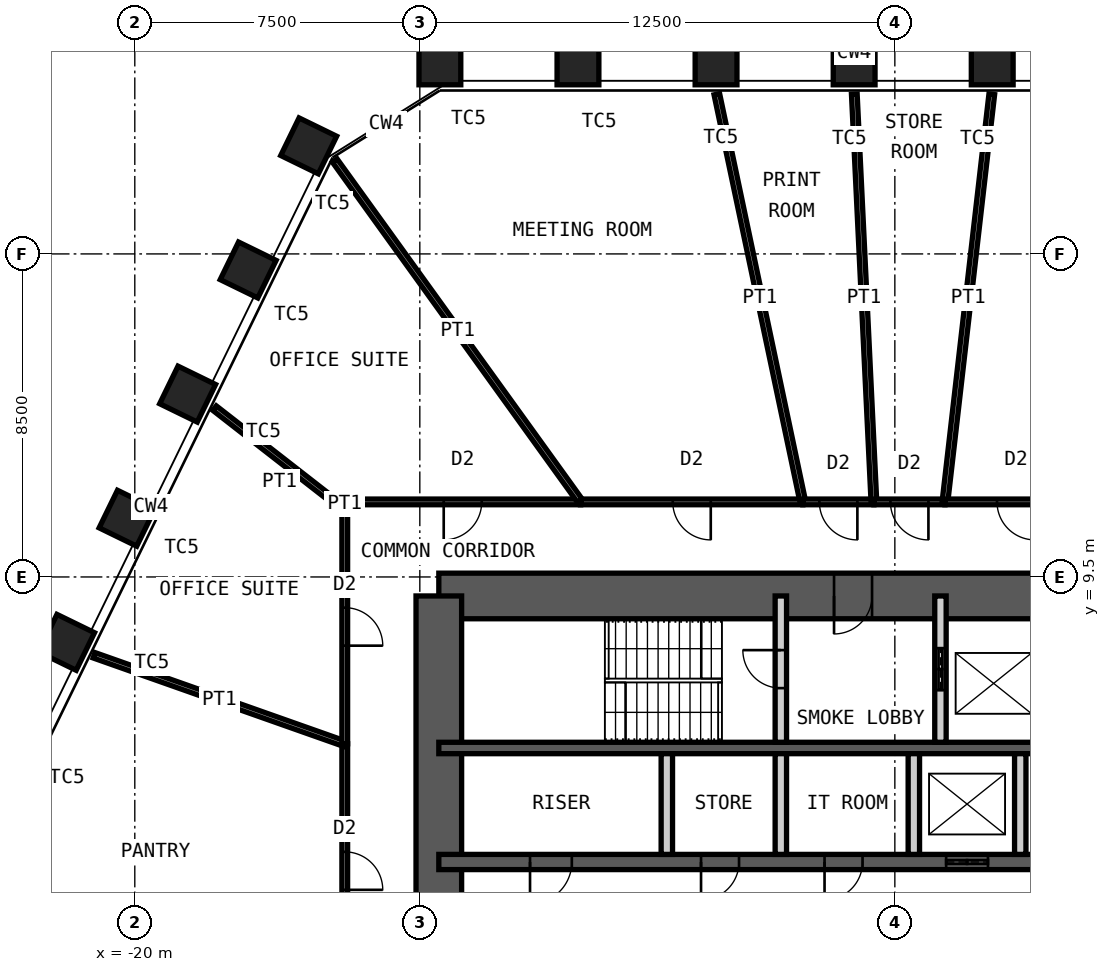
"""IFC4 building model, lengths in metres.
Left out: names, types, materials, properties, quantities, classifications, styles, units other than length and angle.
Written with IfcOpenShell. Run it as: python <this file> out.ifc"""

import sys

from ifc_helpers import new_model, si_unit, direction, frame, frame_2d, origin, origin_2d, place, context, subcontext, project, spatial, rectangle, hollow_rectangle, extrude, element, fill, save


model = new_model("IFC4")
c1 = context("Model", 3, precision=1e-05, world=origin(), true_north=direction((0.0, 1.0)))
c2 = subcontext(c1, "Body", "Model", "MODEL_VIEW")
j1 = project(units=[si_unit("LENGTHUNIT", "METRE"), si_unit("PLANEANGLEUNIT", "RADIAN")], contexts=[c1])
p1 = place(None, origin())
s1 = spatial("IfcSite", under=j1, at=p1, CompositionType="ELEMENT")
p2 = place(p1, origin())
s2 = spatial("IfcBuilding", under=s1, at=p2, CompositionType="ELEMENT")
p3 = place(p2, frame((0.0, 0.0, 197.2)))
s3 = spatial("IfcBuildingStorey", under=s2, at=p3, CompositionType="ELEMENT", Elevation=197.2)
for number, where, z_axis, x_axis in (
    (1, (-11.972, 23.0, 0.0), (0.0, 0.0, 1.0), (-1.0, 0.0, 0.0)),
    (2, (-8.338, 23.0, 0.0), (0.0, 0.0, 1.0), (-1.0, 0.0, 0.0)),
    (3, (-4.705, 23.0, 0.0), (0.0, 0.0, 1.0), (-1.0, 0.0, 0.0)),
    (4, (-1.071, 23.0, 0.0), (0.0, 0.0, 1.0), (-1.0, 0.0, 0.0)),
    (5, (2.562, 23.0, 0.0), (0.0, 0.0, 1.0), (-1.0, 0.0, 0.0)),
    (6, (-21.795, 7.78, 0.0), (0.0, 0.0, 1.0), (-0.438, -0.899, 0.0)),
    (7, (-20.203, 11.045, 0.0), (0.0, 0.0, 1.0), (-0.438, -0.899, 0.0)),
    (8, (-18.61, 14.311, 0.0), (0.0, 0.0, 1.0), (-0.438, -0.899, 0.0)),
    (9, (-17.017, 17.577, 0.0), (0.0, 0.0, 1.0), (-0.438, -0.899, 0.0)),
    (10, (-15.424, 20.843, 0.0), (0.0, 0.0, 1.0), (-0.438, -0.899, 0.0)),
):
    element("IfcColumn", number, at=place(p3, frame(where, z_axis=z_axis, x_axis=x_axis)), inside=s3, PredefinedType="COLUMN", context=c2, shape_type="SweptSolid", body=[
        extrude(hollow_rectangle(XDim=1.1, YDim=1.1, WallThickness=0.07, at=origin_2d()), origin(), (0.0, 0.0, 1.0), 4.2),
    ])
p4 = place(p3, frame((-12.0, 9.0, 0.0), z_axis=(0.0, 0.0, 1.0), x_axis=(1.0, 0.0, 0.0)))
e11 = element("IfcWall", 11, at=p4, inside=s3, PredefinedType="SHEAR", context=c2, shape_type="SweptSolid", body=[
    extrude(rectangle(XDim=24.0, YDim=1.2, at=frame_2d((12.0, 0.0))), origin(), (0.0, 0.0, 1.0), 4.2),
])
p5 = place(p4, frame((10.4, 0.0, 0.0)))
e12 = element("IfcOpeningElement", 12, at=p5, cuts=e11, PredefinedType="OPENING", context=c2, shape_type="SweptSolid", body=[
    extrude(rectangle(XDim=1.0, YDim=2.1, at=frame_2d((0.5, 1.05))), frame((0.0, 0.61, 0.0), z_axis=(0.0, -1.0, 0.0), x_axis=(1.0, 0.0, 0.0)), (0.0, 0.0, 1.0), 1.22),
])
p6 = place(p4, frame((17.6, 0.0, 0.0)))
e13 = element("IfcOpeningElement", 13, at=p6, cuts=e11, PredefinedType="OPENING", context=c2, shape_type="SweptSolid", body=[
    extrude(rectangle(XDim=0.9, YDim=2.1, at=frame_2d((0.45, 1.05))), frame((0.0, 0.61, 0.0), z_axis=(0.0, -1.0, 0.0), x_axis=(1.0, 0.0, 0.0)), (0.0, 0.0, 1.0), 1.22),
])
p7 = place(p4, frame((21.9, 0.0, 0.0)))
e14 = element("IfcOpeningElement", 14, at=p7, cuts=e11, PredefinedType="OPENING", context=c2, shape_type="SweptSolid", body=[
    extrude(rectangle(XDim=0.9, YDim=2.1, at=frame_2d((0.45, 1.05))), frame((0.0, 0.61, 0.0), z_axis=(0.0, -1.0, 0.0), x_axis=(1.0, 0.0, 0.0)), (0.0, 0.0, 1.0), 1.22),
])
p8 = place(p3, frame((-12.0, -9.0, 0.0), z_axis=(0.0, 0.0, 1.0), x_axis=(0.0, 1.0, 0.0)))
e15 = element("IfcWall", 15, at=p8, inside=s3, PredefinedType="SHEAR", context=c2, shape_type="SweptSolid", body=[
    extrude(rectangle(XDim=18.0, YDim=1.2, at=frame_2d((9.0, 0.0))), origin(), (0.0, 0.0, 1.0), 4.2),
])
p9 = place(p8, frame((8.1, 0.0, 0.0)))
e16 = element("IfcOpeningElement", 16, at=p9, cuts=e15, PredefinedType="OPENING", context=c2, shape_type="SweptSolid", body=[
    extrude(rectangle(XDim=1.8, YDim=2.1, at=frame_2d((0.9, 1.05))), frame((0.0, 0.61, 0.0), z_axis=(0.0, -1.0, 0.0), x_axis=(1.0, 0.0, 0.0)), (0.0, 0.0, 1.0), 1.22),
])
p10 = place(p3, frame((-12.0, 5.0, 0.0), z_axis=(0.0, 0.0, 1.0), x_axis=(1.0, 0.0, 0.0)))
e17 = element("IfcWall", 17, at=p10, inside=s3, PredefinedType="SHEAR", context=c2, shape_type="SweptSolid", body=[
    extrude(rectangle(XDim=24.0, YDim=0.3, at=frame_2d((12.0, 0.0))), origin(), (0.0, 0.0, 1.0), 4.2),
])
p11 = place(p3, frame((-12.0, 2.0, 0.0), z_axis=(0.0, 0.0, 1.0), x_axis=(1.0, 0.0, 0.0)))
e18 = element("IfcWall", 18, at=p11, inside=s3, PredefinedType="SHEAR", context=c2, shape_type="SweptSolid", body=[
    extrude(rectangle(XDim=24.0, YDim=0.4, at=frame_2d((12.0, 0.0))), origin(), (0.0, 0.0, 1.0), 4.2),
])
p12 = place(p11, frame((2.4, 0.0, 0.0)))
e19 = element("IfcOpeningElement", 19, at=p12, cuts=e18, PredefinedType="OPENING", context=c2, shape_type="SweptSolid", body=[
    extrude(rectangle(XDim=1.1, YDim=2.1, at=frame_2d((0.55, 1.05))), frame((0.0, 0.21, 0.0), z_axis=(0.0, -1.0, 0.0), x_axis=(1.0, 0.0, 0.0)), (0.0, 0.0, 1.0), 0.42),
])
p13 = place(p11, frame((22.0, 0.0, 0.0)))
e20 = element("IfcOpeningElement", 20, at=p13, cuts=e18, PredefinedType="OPENING", context=c2, shape_type="SweptSolid", body=[
    extrude(rectangle(XDim=1.1, YDim=2.1, at=frame_2d((0.55, 1.05))), frame((0.0, 0.21, 0.0), z_axis=(0.0, -1.0, 0.0), x_axis=(1.0, 0.0, 0.0)), (0.0, 0.0, 1.0), 0.42),
])
p14 = place(p11, frame((10.15, 0.0, 0.0)))
e21 = element("IfcOpeningElement", 21, at=p14, cuts=e18, PredefinedType="OPENING", context=c2, shape_type="SweptSolid", body=[
    extrude(rectangle(XDim=1.0, YDim=2.1, at=frame_2d((0.5, 1.05))), frame((0.0, 0.21, 0.0), z_axis=(0.0, -1.0, 0.0), x_axis=(1.0, 0.0, 0.0)), (0.0, 0.0, 1.0), 0.42),
])
p15 = place(p11, frame((6.9, 0.0, 0.0)))
e22 = element("IfcOpeningElement", 22, at=p15, cuts=e18, PredefinedType="OPENING", context=c2, shape_type="SweptSolid", body=[
    extrude(rectangle(XDim=1.0, YDim=2.1, at=frame_2d((0.5, 1.05))), frame((0.0, 0.21, 0.0), z_axis=(0.0, -1.0, 0.0), x_axis=(1.0, 0.0, 0.0)), (0.0, 0.0, 1.0), 0.42),
])
p16 = place(p11, frame((13.35, 0.0, 0.0)))
e23 = element("IfcOpeningElement", 23, at=p16, cuts=e18, PredefinedType="OPENING", context=c2, shape_type="SweptSolid", body=[
    extrude(rectangle(XDim=1.1, YDim=2.4, at=frame_2d((0.55, 1.2))), frame((0.0, 0.21, 0.0), z_axis=(0.0, -1.0, 0.0), x_axis=(1.0, 0.0, 0.0)), (0.0, 0.0, 1.0), 0.42),
])
p17 = place(p11, frame((16.15, 0.0, 0.0)))
e24 = element("IfcOpeningElement", 24, at=p17, cuts=e18, PredefinedType="OPENING", context=c2, shape_type="SweptSolid", body=[
    extrude(rectangle(XDim=1.1, YDim=2.4, at=frame_2d((0.55, 1.2))), frame((0.0, 0.21, 0.0), z_axis=(0.0, -1.0, 0.0), x_axis=(1.0, 0.0, 0.0)), (0.0, 0.0, 1.0), 0.42),
])
p18 = place(p11, frame((18.95, 0.0, 0.0)))
e25 = element("IfcOpeningElement", 25, at=p18, cuts=e18, PredefinedType="OPENING", context=c2, shape_type="SweptSolid", body=[
    extrude(rectangle(XDim=1.1, YDim=2.4, at=frame_2d((0.55, 1.2))), frame((0.0, 0.21, 0.0), z_axis=(0.0, -1.0, 0.0), x_axis=(1.0, 0.0, 0.0)), (0.0, 0.0, 1.0), 0.42),
])
p19 = place(p3, frame((-3.0, 5.15, 0.0), z_axis=(0.0, 0.0, 1.0), x_axis=(0.0, 1.0, 0.0)))
e26 = element("IfcWall", 26, at=p19, inside=s3, PredefinedType="PARTITIONING", context=c2, shape_type="SweptSolid", body=[
    extrude(rectangle(XDim=3.85, YDim=0.3, at=frame_2d((1.925, 0.0))), origin(), (0.0, 0.0, 1.0), 3.98),
])
p20 = place(p19, frame((1.425, 0.0, 0.0)))
e27 = element("IfcOpeningElement", 27, at=p20, cuts=e26, PredefinedType="OPENING", context=c2, shape_type="SweptSolid", body=[
    extrude(rectangle(XDim=1.0, YDim=2.1, at=frame_2d((0.5, 1.05))), frame((0.0, 0.16, 0.0), z_axis=(0.0, -1.0, 0.0), x_axis=(1.0, 0.0, 0.0)), (0.0, 0.0, 1.0), 0.32),
])
p21 = place(p3, frame((1.2, 5.15, 0.0), z_axis=(0.0, 0.0, 1.0), x_axis=(0.0, 1.0, 0.0)))
e28 = element("IfcWall", 28, at=p21, inside=s3, PredefinedType="PARTITIONING", context=c2, shape_type="SweptSolid", body=[
    extrude(rectangle(XDim=3.85, YDim=0.3, at=frame_2d((1.925, 0.0))), origin(), (0.0, 0.0, 1.0), 3.98),
])
p22 = place(p21, frame((1.375, 0.0, 0.0)))
e29 = element("IfcOpeningElement", 29, at=p22, cuts=e28, PredefinedType="OPENING", context=c2, shape_type="SweptSolid", body=[
    extrude(rectangle(XDim=1.1, YDim=2.4, at=frame_2d((0.55, 1.2))), frame((0.0, 0.16, 0.0), z_axis=(0.0, -1.0, 0.0), x_axis=(1.0, 0.0, 0.0)), (0.0, 0.0, 1.0), 0.32),
])
for number, where, z_axis, x_axis in (
    (30, (-6.0, 2.2, 0.0), (0.0, 0.0, 1.0), (0.0, 1.0, 0.0)),
    (31, (-3.0, 2.2, 0.0), (0.0, 0.0, 1.0), (0.0, 1.0, 0.0)),
    (32, (0.5, 2.2, 0.0), (0.0, 0.0, 1.0), (0.0, 1.0, 0.0)),
    (33, (3.3, 2.2, 0.0), (0.0, 0.0, 1.0), (0.0, 1.0, 0.0)),
):
    element("IfcWall", number, at=place(p3, frame(where, z_axis=z_axis, x_axis=x_axis)), inside=s3, PredefinedType="PARTITIONING", context=c2, shape_type="SweptSolid", body=[
        extrude(rectangle(XDim=2.65, YDim=0.3, at=frame_2d((1.325, 0.0))), origin(), (0.0, 0.0, 1.0), 3.98),
    ])
p23 = place(p3, frame((-14.475, -1.576, 0.0), z_axis=(0.0, 0.0, 1.0), x_axis=(0.0, 1.0, 0.0)))
e34 = element("IfcWall", 34, at=p23, inside=s3, PredefinedType="PARTITIONING", context=c2, shape_type="SweptSolid", body=[
    extrude(rectangle(XDim=6.686, YDim=0.15, at=frame_2d((3.343, 0.0))), origin(), (0.0, 0.0, 1.0), 4.03),
])
p24 = place(p23, frame((2.843, 0.0, 0.0)))
e35 = element("IfcOpeningElement", 35, at=p24, cuts=e34, PredefinedType="OPENING", context=c2, shape_type="SweptSolid", body=[
    extrude(rectangle(XDim=1.0, YDim=2.4, at=frame_2d((0.5, 1.2))), frame((0.0, 0.085, 0.0), z_axis=(0.0, -1.0, 0.0), x_axis=(1.0, 0.0, 0.0)), (0.0, 0.0, 1.0), 0.17),
])
p25 = place(p3, frame((-21.072, 7.439, 0.0), z_axis=(0.0, 0.0, 1.0), x_axis=(0.94295553867, -0.332918686907, 0.0)))
e36 = element("IfcWall", 36, at=p25, inside=s3, PredefinedType="PARTITIONING", context=c2, shape_type="SweptSolid", body=[
    extrude(rectangle(XDim=6.996, YDim=0.15, at=frame_2d((3.498, 0.0))), origin(), (0.0, 0.0, 1.0), 3.43),
])
p26 = place(p3, frame((-14.475, 5.11, 0.0), z_axis=(0.0, 0.0, 1.0), x_axis=(0.0, 1.0, 0.0)))
e37 = element("IfcWall", 37, at=p26, inside=s3, PredefinedType="PARTITIONING", context=c2, shape_type="SweptSolid", body=[
    extrude(rectangle(XDim=6.164, YDim=0.15, at=frame_2d((3.082, 0.0))), origin(), (0.0, 0.0, 1.0), 4.03),
])
p27 = place(p26, frame((2.582, 0.0, 0.0)))
e38 = element("IfcOpeningElement", 38, at=p27, cuts=e37, PredefinedType="OPENING", context=c2, shape_type="SweptSolid", body=[
    extrude(rectangle(XDim=1.0, YDim=2.4, at=frame_2d((0.5, 1.2))), frame((0.0, 0.085, 0.0), z_axis=(0.0, -1.0, 0.0), x_axis=(1.0, 0.0, 0.0)), (0.0, 0.0, 1.0), 0.17),
])
p28 = place(p3, frame((-17.902, 13.943, 0.0), z_axis=(0.0, 0.0, 1.0), x_axis=(0.788919197717, -0.614496948303, 0.0)))
e39 = element("IfcWall", 39, at=p28, inside=s3, PredefinedType="PARTITIONING", context=c2, shape_type="SweptSolid", body=[
    extrude(rectangle(XDim=4.343, YDim=0.15, at=frame_2d((2.172, 0.0))), origin(), (0.0, 0.0, 1.0), 3.43),
])
p29 = place(p3, frame((-14.475, 11.369, 0.0), z_axis=(0.0, 0.0, 1.0), x_axis=(0.0, 1.0, 0.0)))
e40 = element("IfcWall", 40, at=p29, inside=s3, PredefinedType="PARTITIONING", context=c2, shape_type="SweptSolid", body=[
    extrude(rectangle(XDim=0.106, YDim=0.15, at=frame_2d((0.053, 0.0))), origin(), (0.0, 0.0, 1.0), 4.03),
])
p30 = place(p3, frame((-14.475, 11.475, 0.0), z_axis=(0.0, 0.0, 1.0), x_axis=(1.0, 0.0, 0.0)))
e41 = element("IfcWall", 41, at=p30, inside=s3, PredefinedType="PARTITIONING", context=c2, shape_type="SweptSolid", body=[
    extrude(rectangle(XDim=6.208, YDim=0.15, at=frame_2d((3.104, 0.0))), origin(), (0.0, 0.0, 1.0), 4.03),
])
p31 = place(p30, frame((2.604, 0.0, 0.0)))
e42 = element("IfcOpeningElement", 42, at=p31, cuts=e41, PredefinedType="OPENING", context=c2, shape_type="SweptSolid", body=[
    extrude(rectangle(XDim=1.0, YDim=2.4, at=frame_2d((0.5, 1.2))), frame((0.0, 0.085, 0.0), z_axis=(0.0, -1.0, 0.0), x_axis=(1.0, 0.0, 0.0)), (0.0, 0.0, 1.0), 0.17),
])
p32 = place(p3, frame((-14.737, 20.455, 0.0), z_axis=(0.0, 0.0, 1.0), x_axis=(0.584547025688, -0.811359830629, 0.0)))
e43 = element("IfcWall", 43, at=p32, inside=s3, PredefinedType="PARTITIONING", context=c2, shape_type="SweptSolid", body=[
    extrude(rectangle(XDim=11.068, YDim=0.15, at=frame_2d((5.534, 0.0))), origin(), (0.0, 0.0, 1.0), 2.93),
])
p33 = place(p3, frame((-8.267, 11.475, 0.0), z_axis=(0.0, 0.0, 1.0), x_axis=(1.0, 0.0, 0.0)))
e44 = element("IfcWall", 44, at=p33, inside=s3, PredefinedType="PARTITIONING", context=c2, shape_type="SweptSolid", body=[
    extrude(rectangle(XDim=5.846, YDim=0.15, at=frame_2d((2.923, 0.0))), origin(), (0.0, 0.0, 1.0), 4.03),
])
p34 = place(p33, frame((2.423, 0.0, 0.0)))
e45 = element("IfcOpeningElement", 45, at=p34, cuts=e44, PredefinedType="OPENING", context=c2, shape_type="SweptSolid", body=[
    extrude(rectangle(XDim=1.0, YDim=2.4, at=frame_2d((0.5, 1.2))), frame((0.0, 0.085, 0.0), z_axis=(0.0, -1.0, 0.0), x_axis=(1.0, 0.0, 0.0)), (0.0, 0.0, 1.0), 0.17),
])
p35 = place(p3, frame((-4.684, 22.202, 0.0), z_axis=(0.0, 0.0, 1.0), x_axis=(0.206456017157, -0.978455881979, 0.0)))
e46 = element("IfcWall", 46, at=p35, inside=s3, PredefinedType="PARTITIONING", context=c2, shape_type="SweptSolid", body=[
    extrude(rectangle(XDim=10.963, YDim=0.15, at=frame_2d((5.481, 0.0))), origin(), (0.0, 0.0, 1.0), 3.43),
])
p36 = place(p3, frame((-2.421, 11.475, 0.0), z_axis=(0.0, 0.0, 1.0), x_axis=(1.0, 0.0, 0.0)))
e47 = element("IfcWall", 47, at=p36, inside=s3, PredefinedType="PARTITIONING", context=c2, shape_type="SweptSolid", body=[
    extrude(rectangle(XDim=1.87, YDim=0.15, at=frame_2d((0.935, 0.0))), origin(), (0.0, 0.0, 1.0), 4.03),
])
p37 = place(p36, frame((0.435, 0.0, 0.0)))
e48 = element("IfcOpeningElement", 48, at=p37, cuts=e47, PredefinedType="OPENING", context=c2, shape_type="SweptSolid", body=[
    extrude(rectangle(XDim=1.0, YDim=2.4, at=frame_2d((0.5, 1.2))), frame((0.0, 0.085, 0.0), z_axis=(0.0, -1.0, 0.0), x_axis=(1.0, 0.0, 0.0)), (0.0, 0.0, 1.0), 0.17),
])
p38 = place(p3, frame((-1.067, 22.2, 0.0), z_axis=(0.0, 0.0, 1.0), x_axis=(0.047998335863, -0.998847415652, 0.0)))
e49 = element("IfcWall", 49, at=p38, inside=s3, PredefinedType="PARTITIONING", context=c2, shape_type="SweptSolid", body=[
    extrude(rectangle(XDim=10.738, YDim=0.15, at=frame_2d((5.369, 0.0))), origin(), (0.0, 0.0, 1.0), 3.43),
])
p39 = place(p3, frame((-0.551, 11.475, 0.0), z_axis=(0.0, 0.0, 1.0), x_axis=(1.0, 0.0, 0.0)))
e50 = element("IfcWall", 50, at=p39, inside=s3, PredefinedType="PARTITIONING", context=c2, shape_type="SweptSolid", body=[
    extrude(rectangle(XDim=1.87, YDim=0.15, at=frame_2d((0.935, 0.0))), origin(), (0.0, 0.0, 1.0), 4.03),
])
p40 = place(p39, frame((0.435, 0.0, 0.0)))
e51 = element("IfcOpeningElement", 51, at=p40, cuts=e50, PredefinedType="OPENING", context=c2, shape_type="SweptSolid", body=[
    extrude(rectangle(XDim=1.0, YDim=2.4, at=frame_2d((0.5, 1.2))), frame((0.0, 0.085, 0.0), z_axis=(0.0, -1.0, 0.0), x_axis=(1.0, 0.0, 0.0)), (0.0, 0.0, 1.0), 0.17),
])
p41 = place(p3, frame((2.551, 22.201, 0.0), z_axis=(0.0, 0.0, 1.0), x_axis=(-0.11415373111, -0.993463097288, 0.0)))
e52 = element("IfcWall", 52, at=p41, inside=s3, PredefinedType="PARTITIONING", context=c2, shape_type="SweptSolid", body=[
    extrude(rectangle(XDim=10.796, YDim=0.15, at=frame_2d((5.398, 0.0))), origin(), (0.0, 0.0, 1.0), 3.43),
])
p42 = place(p3, frame((1.318, 11.475, 0.0), z_axis=(0.0, 0.0, 1.0), x_axis=(1.0, 0.0, 0.0)))
e53 = element("IfcWall", 53, at=p42, inside=s3, PredefinedType="PARTITIONING", context=c2, shape_type="SweptSolid", body=[
    extrude(rectangle(XDim=3.74, YDim=0.15, at=frame_2d((1.87, 0.0))), origin(), (0.0, 0.0, 1.0), 4.03),
])
p43 = place(p42, frame((1.37, 0.0, 0.0)))
e54 = element("IfcOpeningElement", 54, at=p43, cuts=e53, PredefinedType="OPENING", context=c2, shape_type="SweptSolid", body=[
    extrude(rectangle(XDim=1.0, YDim=2.4, at=frame_2d((0.5, 1.2))), frame((0.0, 0.085, 0.0), z_axis=(0.0, -1.0, 0.0), x_axis=(1.0, 0.0, 0.0)), (0.0, 0.0, 1.0), 0.17),
])
p44 = place(p5, origin())
e55 = element("IfcDoor", 55, at=p44, inside=s3, OperationType="SINGLE_SWING_LEFT", PredefinedType="DOOR", context=c2, shape_type="SweptSolid", body=[
    extrude(rectangle(XDim=1.0, YDim=2.1, at=frame_2d((0.5, 1.05))), frame((0.0, 0.025, 0.0), z_axis=(0.0, -1.0, 0.0), x_axis=(1.0, 0.0, 0.0)), (0.0, 0.0, 1.0), 0.05),
])
fill(e12, e55)
p45 = place(p20, origin())
e56 = element("IfcDoor", 56, at=p45, inside=s3, OperationType="SINGLE_SWING_LEFT", PredefinedType="DOOR", context=c2, shape_type="SweptSolid", body=[
    extrude(rectangle(XDim=1.0, YDim=2.1, at=frame_2d((0.5, 1.05))), frame((0.0, 0.025, 0.0), z_axis=(0.0, -1.0, 0.0), x_axis=(1.0, 0.0, 0.0)), (0.0, 0.0, 1.0), 0.05),
])
fill(e27, e56)
p46 = place(p12, origin())
e57 = element("IfcDoor", 57, at=p46, inside=s3, OperationType="SINGLE_SWING_LEFT", PredefinedType="DOOR", context=c2, shape_type="SweptSolid", body=[
    extrude(rectangle(XDim=1.1, YDim=2.1, at=frame_2d((0.55, 1.05))), frame((0.0, 0.025, 0.0), z_axis=(0.0, -1.0, 0.0), x_axis=(1.0, 0.0, 0.0)), (0.0, 0.0, 1.0), 0.05),
])
fill(e19, e57)
p47 = place(p14, origin())
e58 = element("IfcDoor", 58, at=p47, inside=s3, OperationType="SINGLE_SWING_LEFT", PredefinedType="DOOR", context=c2, shape_type="SweptSolid", body=[
    extrude(rectangle(XDim=1.0, YDim=2.1, at=frame_2d((0.5, 1.05))), frame((0.0, 0.025, 0.0), z_axis=(0.0, -1.0, 0.0), x_axis=(1.0, 0.0, 0.0)), (0.0, 0.0, 1.0), 0.05),
])
fill(e21, e58)
p48 = place(p22, origin())
e59 = element("IfcDoor", 59, at=p48, inside=s3, OperationType="DOUBLE_DOOR_SLIDING", PredefinedType="DOOR", context=c2, shape_type="SweptSolid", body=[
    extrude(rectangle(XDim=1.1, YDim=2.4, at=frame_2d((0.55, 1.2))), frame((0.0, 0.025, 0.0), z_axis=(0.0, -1.0, 0.0), x_axis=(1.0, 0.0, 0.0)), (0.0, 0.0, 1.0), 0.05),
])
fill(e29, e59)
p49 = place(p15, origin())
e60 = element("IfcDoor", 60, at=p49, inside=s3, OperationType="SINGLE_SWING_LEFT", PredefinedType="DOOR", context=c2, shape_type="SweptSolid", body=[
    extrude(rectangle(XDim=1.0, YDim=2.1, at=frame_2d((0.5, 1.05))), frame((0.0, 0.025, 0.0), z_axis=(0.0, -1.0, 0.0), x_axis=(1.0, 0.0, 0.0)), (0.0, 0.0, 1.0), 0.05),
])
fill(e22, e60)
p50 = place(p16, origin())
e61 = element("IfcDoor", 61, at=p50, inside=s3, OperationType="DOUBLE_DOOR_SLIDING", PredefinedType="DOOR", context=c2, shape_type="SweptSolid", body=[
    extrude(rectangle(XDim=1.1, YDim=2.4, at=frame_2d((0.55, 1.2))), frame((0.0, 0.025, 0.0), z_axis=(0.0, -1.0, 0.0), x_axis=(1.0, 0.0, 0.0)), (0.0, 0.0, 1.0), 0.05),
])
fill(e23, e61)
p51 = place(p24, origin())
e62 = element("IfcDoor", 62, at=p51, inside=s3, OperationType="SINGLE_SWING_LEFT", PredefinedType="DOOR", context=c2, shape_type="SweptSolid", body=[
    extrude(rectangle(XDim=1.0, YDim=2.4, at=frame_2d((0.5, 1.2))), frame((0.0, 0.025, 0.0), z_axis=(0.0, -1.0, 0.0), x_axis=(1.0, 0.0, 0.0)), (0.0, 0.0, 1.0), 0.05),
])
fill(e35, e62)
p52 = place(p27, origin())
e63 = element("IfcDoor", 63, at=p52, inside=s3, OperationType="SINGLE_SWING_LEFT", PredefinedType="DOOR", context=c2, shape_type="SweptSolid", body=[
    extrude(rectangle(XDim=1.0, YDim=2.4, at=frame_2d((0.5, 1.2))), frame((0.0, 0.025, 0.0), z_axis=(0.0, -1.0, 0.0), x_axis=(1.0, 0.0, 0.0)), (0.0, 0.0, 1.0), 0.05),
])
fill(e38, e63)
p53 = place(p31, origin())
e64 = element("IfcDoor", 64, at=p53, inside=s3, OperationType="SINGLE_SWING_LEFT", PredefinedType="DOOR", context=c2, shape_type="SweptSolid", body=[
    extrude(rectangle(XDim=1.0, YDim=2.4, at=frame_2d((0.5, 1.2))), frame((0.0, 0.025, 0.0), z_axis=(0.0, -1.0, 0.0), x_axis=(1.0, 0.0, 0.0)), (0.0, 0.0, 1.0), 0.05),
])
fill(e42, e64)
p54 = place(p34, origin())
e65 = element("IfcDoor", 65, at=p54, inside=s3, OperationType="SINGLE_SWING_RIGHT", PredefinedType="DOOR", context=c2, shape_type="SweptSolid", body=[
    extrude(rectangle(XDim=1.0, YDim=2.4, at=frame_2d((0.5, 1.2))), frame((0.0, 0.025, 0.0), z_axis=(0.0, -1.0, 0.0), x_axis=(1.0, 0.0, 0.0)), (0.0, 0.0, 1.0), 0.05),
])
fill(e45, e65)
p55 = place(p37, origin())
e66 = element("IfcDoor", 66, at=p55, inside=s3, OperationType="SINGLE_SWING_RIGHT", PredefinedType="DOOR", context=c2, shape_type="SweptSolid", body=[
    extrude(rectangle(XDim=1.0, YDim=2.4, at=frame_2d((0.5, 1.2))), frame((0.0, 0.025, 0.0), z_axis=(0.0, -1.0, 0.0), x_axis=(1.0, 0.0, 0.0)), (0.0, 0.0, 1.0), 0.05),
])
fill(e48, e66)
p56 = place(p40, origin())
e67 = element("IfcDoor", 67, at=p56, inside=s3, OperationType="SINGLE_SWING_RIGHT", PredefinedType="DOOR", context=c2, shape_type="SweptSolid", body=[
    extrude(rectangle(XDim=1.0, YDim=2.4, at=frame_2d((0.5, 1.2))), frame((0.0, 0.025, 0.0), z_axis=(0.0, -1.0, 0.0), x_axis=(1.0, 0.0, 0.0)), (0.0, 0.0, 1.0), 0.05),
])
fill(e51, e67)
p57 = place(p43, origin())
e68 = element("IfcDoor", 68, at=p57, inside=s3, OperationType="SINGLE_SWING_RIGHT", PredefinedType="DOOR", context=c2, shape_type="SweptSolid", body=[
    extrude(rectangle(XDim=1.0, YDim=2.4, at=frame_2d((0.5, 1.2))), frame((0.0, 0.025, 0.0), z_axis=(0.0, -1.0, 0.0), x_axis=(1.0, 0.0, 0.0)), (0.0, 0.0, 1.0), 0.05),
])
fill(e54, e68)
save(model, sys.argv[1])
